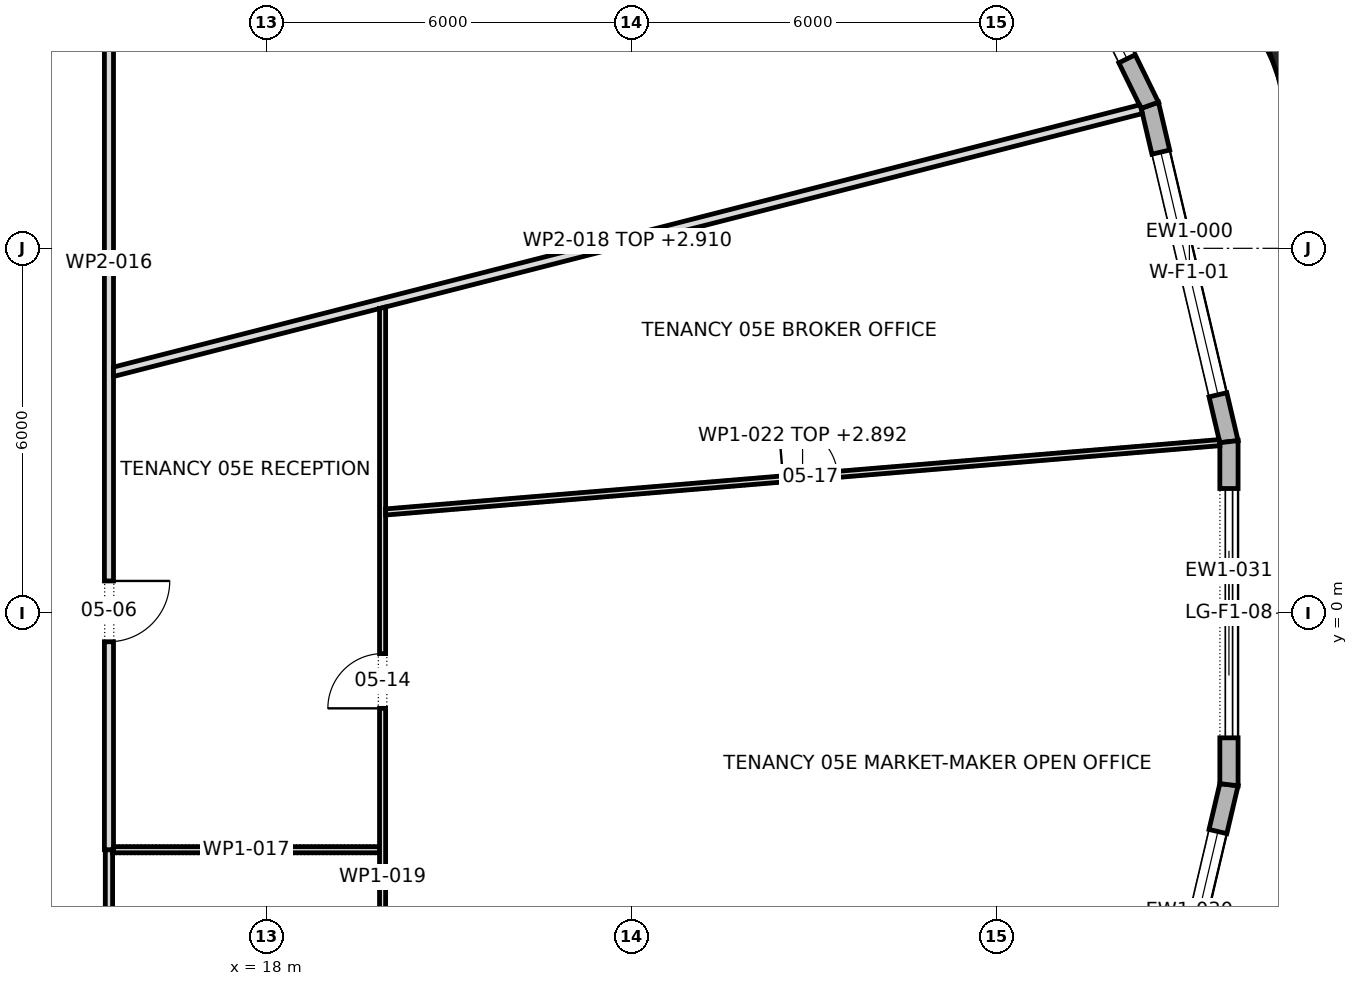
"""IFC4 building model, lengths in metres.
Left out: names, types, materials, properties, quantities, classifications, styles, units other than length and angle.
Written with IfcOpenShell. Run it as: python <this file> out.ifc"""

import sys

from ifc_helpers import new_model, si_unit, direction, frame, frame_2d, origin, origin_2d, place, context, subcontext, project, spatial, polyline, rectangle, outline, extrude, element, fill, save


model = new_model("IFC4")
c1 = context("Model", 3, precision=1e-05, world=origin(), true_north=direction((0.0, 1.0)))
c2 = subcontext(c1, "Body", "Model", "MODEL_VIEW")
j1 = project(units=[si_unit("LENGTHUNIT", "METRE"), si_unit("PLANEANGLEUNIT", "RADIAN")], contexts=[c1])
p1 = place(None, origin())
s1 = spatial("IfcSite", under=j1, at=p1, CompositionType="ELEMENT")
p2 = place(p1, origin())
s2 = spatial("IfcBuilding", under=s1, at=p2, CompositionType="ELEMENT")
p3 = place(p2, frame((0.0, 0.0, 73.9)))
s3 = spatial("IfcBuildingStorey", under=s2, at=p3, CompositionType="ELEMENT", Elevation=73.9)
p4 = place(p3, frame((35.054, 9.115, 0.0), z_axis=(0.0, 0.0, 1.0), x_axis=(-0.333624233576, 0.942706142321, 0.0)))
e1 = element("IfcColumn", 1, at=p4, inside=s3, PredefinedType="COLUMN", context=c2, shape_type="SweptSolid", body=[
    extrude(rectangle(XDim=1.6, YDim=1.0, at=origin_2d()), origin(), (0.0, 0.0, 1.0), 4.2),
])
p5 = place(p3, frame((33.819, 2.821, 0.0), z_axis=(0.0, 0.0, 1.0), x_axis=(-0.229058489262, 0.97341266095, 0.0)))
e2 = element("IfcWall", 2, at=p5, inside=s3, PredefinedType="STANDARD", context=c2, shape_type="SweptSolid", body=[
    extrude(outline(polyline([(-0.017, -0.15), (5.7, -0.15), (5.666, 0.15), (0.017, 0.15), (-0.017, -0.15)])), origin(), (0.0, 0.0, 1.0), 3.9),
])
p6 = place(p5, frame((0.792, 0.0, 0.6)))
e3 = element("IfcOpeningElement", 3, at=p6, cuts=e2, PredefinedType="OPENING", context=c2, shape_type="SweptSolid", body=[
    extrude(rectangle(XDim=4.1, YDim=2.85, at=frame_2d((2.05, 1.425))), frame((0.0, 0.162, 0.0), z_axis=(0.0, -1.0, 0.0), x_axis=(1.0, 0.0, 0.0)), (0.0, 0.0, 1.0), 0.324),
])
p7 = place(p3, frame((32.517, 8.353, 0.0), z_axis=(0.0, 0.0, 1.0), x_axis=(-0.440027465772, 0.897984314655, 0.0)))
e4 = element("IfcWall", 4, at=p7, inside=s3, PredefinedType="STANDARD", context=c2, shape_type="SweptSolid", body=[
    extrude(outline(polyline([(-0.017, -0.15), (5.817, -0.15), (5.785, 0.15), (0.017, 0.15), (-0.017, -0.15)])), origin(), (0.0, 0.0, 1.0), 3.9),
])
p8 = place(p7, frame((0.85, 0.0, 0.6)))
e5 = element("IfcOpeningElement", 5, at=p8, cuts=e4, PredefinedType="OPENING", context=c2, shape_type="SweptSolid", body=[
    extrude(rectangle(XDim=4.1, YDim=2.85, at=frame_2d((2.05, 1.425))), frame((0.0, 0.162, 0.0), z_axis=(0.0, -1.0, 0.0), x_axis=(1.0, 0.0, 0.0)), (0.0, 0.0, 1.0), 0.324),
])
p9 = place(p3, frame((32.517, -8.353, 0.0), z_axis=(0.0, 0.0, 1.0), x_axis=(0.229058489262, 0.97341266095, 0.0)))
e6 = element("IfcWall", 6, at=p9, inside=s3, PredefinedType="STANDARD", context=c2, shape_type="SweptSolid", body=[
    extrude(outline(polyline([(-0.017, -0.15), (5.7, -0.15), (5.666, 0.15), (0.017, 0.15), (-0.017, -0.15)])), origin(), (0.0, 0.0, 1.0), 3.9),
])
p10 = place(p9, frame((0.792, 0.0, 0.6)))
e7 = element("IfcOpeningElement", 7, at=p10, cuts=e6, PredefinedType="OPENING", context=c2, shape_type="SweptSolid", body=[
    extrude(rectangle(XDim=4.1, YDim=2.85, at=frame_2d((2.05, 1.425))), frame((0.0, 0.162, 0.0), z_axis=(0.0, -1.0, 0.0), x_axis=(1.0, 0.0, 0.0)), (0.0, 0.0, 1.0), 0.324),
])
p11 = place(p3, frame((33.819, -2.821, 0.0), z_axis=(0.0, 0.0, 1.0), x_axis=(0.0, 1.0, 0.0)))
e8 = element("IfcWall", 8, at=p11, inside=s3, PredefinedType="STANDARD", context=c2, shape_type="SweptSolid", body=[
    extrude(outline(polyline([(-0.017, -0.15), (5.658, -0.15), (5.624, 0.15), (0.017, 0.15), (-0.017, -0.15)])), origin(), (0.0, 0.0, 1.0), 3.9),
])
p12 = place(p11, frame((0.771, 0.0, 0.0)))
e9 = element("IfcOpeningElement", 9, at=p12, cuts=e8, PredefinedType="OPENING", context=c2, shape_type="SweptSolid", body=[
    extrude(rectangle(XDim=4.1, YDim=3.45, at=frame_2d((2.05, 1.725))), frame((0.0, 0.162, 0.0), z_axis=(0.0, -1.0, 0.0), x_axis=(1.0, 0.0, 0.0)), (0.0, 0.0, 1.0), 0.324),
])
p13 = place(p3, frame((15.4, -3.89, 0.0), z_axis=(0.0, 0.0, 1.0), x_axis=(0.0, -1.0, 0.0)))
e10 = element("IfcWall", 10, at=p13, inside=s3, PredefinedType="PARTITIONING", context=c2, shape_type="SweptSolid", body=[
    extrude(rectangle(XDim=6.79, YDim=0.12, at=frame_2d((3.395, 0.0))), origin(), (0.0, 0.0, 1.0), 3.9),
])
p14 = place(p13, frame((2.895, 0.0, 0.0)))
e11 = element("IfcOpeningElement", 11, at=p14, cuts=e10, PredefinedType="OPENING", context=c2, shape_type="SweptSolid", body=[
    extrude(rectangle(XDim=1.0, YDim=2.1, at=frame_2d((0.5, 1.05))), frame((0.0, 0.072, 0.0), z_axis=(0.0, -1.0, 0.0), x_axis=(1.0, 0.0, 0.0)), (0.0, 0.0, 1.0), 0.144),
])
p15 = place(p3, frame((15.4, -3.89, 0.0), z_axis=(0.0, 0.0, 1.0), x_axis=(0.0, 1.0, 0.0)))
e12 = element("IfcWall", 12, at=p15, inside=s3, PredefinedType="PARTITIONING", context=c2, shape_type="SweptSolid", body=[
    extrude(outline(polyline([(0.0, -0.075), (1.937, -0.075), (3.873, -0.075), (5.809, -0.075), (7.746, -0.075), (9.682, -0.075), (11.619, -0.075), (13.555, -0.075), (15.492, -0.075), (17.428, -0.075), (19.365, -0.075), (19.215, 0.075), (17.293, 0.075), (15.372, 0.075), (13.45, 0.075), (11.529, 0.075), (9.607, 0.075), (7.686, 0.075), (5.764, 0.075), (3.843, 0.075), (1.921, 0.075), (0.0, 0.075), (0.0, -0.075)])), origin(), (0.0, 0.0, 1.0), 3.9),
])
p16 = place(p15, frame((3.42, 0.0, 0.0)))
e13 = element("IfcOpeningElement", 13, at=p16, cuts=e12, PredefinedType="OPENING", context=c2, shape_type="SweptSolid", body=[
    extrude(rectangle(XDim=1.0, YDim=2.1, at=frame_2d((0.5, 1.05))), frame((0.0, 0.087, 0.0), z_axis=(0.0, -1.0, 0.0), x_axis=(1.0, 0.0, 0.0)), (0.0, 0.0, 1.0), 0.174),
])
p17 = place(p3, frame((15.46, -3.89, 0.0), z_axis=(0.0, 0.0, 1.0), x_axis=(1.0, 0.0, 0.0)))
e14 = element("IfcWall", 14, at=p17, inside=s3, PredefinedType="PARTITIONING", context=c2, shape_type="SweptSolid", body=[
    extrude(outline(polyline([(0.0, -0.05), (1.463, -0.05), (2.926, -0.05), (4.39, -0.05), (4.39, 0.05), (2.931, 0.05), (1.473, 0.05), (0.015, 0.05), (0.015, 0.0), (0.0, 0.0), (0.0, -0.05)])), origin(), (0.0, 0.0, 1.0), 3.9),
])
p18 = place(p3, frame((15.457, 3.965, 0.0), z_axis=(0.0, 0.0, 1.0), x_axis=(0.968864500014, 0.24759156006, 0.0)))
e15 = element("IfcWall", 15, at=p18, inside=s3, PredefinedType="PARTITIONING", context=c2, shape_type="SweptSolid", body=[
    extrude(outline(polyline([(0.0, -0.075), (1.505, -0.075), (3.01, -0.075), (4.515, -0.075), (4.515, -0.075), (4.516, -0.075), (6.365, -0.075), (8.215, -0.075), (10.064, -0.075), (11.914, -0.075), (13.764, -0.075), (15.614, -0.075), (17.463, -0.075), (17.463, 0.023), (17.452, 0.075), (15.517, 0.075), (13.582, 0.075), (11.647, 0.075), (9.713, 0.075), (7.778, 0.075), (5.843, 0.075), (3.908, 0.075), (1.973, 0.075), (0.038, 0.075), (0.0, -0.073), (0.0, -0.075)])), origin(), (0.0, 0.0, 1.0), 2.91),
])
p19 = place(p3, frame((19.9, -13.744, 0.0), z_axis=(0.0, 0.0, 1.0), x_axis=(0.0, 1.0, 0.0)))
e16 = element("IfcWall", 16, at=p19, inside=s3, PredefinedType="PARTITIONING", context=c2, shape_type="SweptSolid", body=[
    extrude(outline(polyline([(0.0, -0.05), (1.559, -0.05), (3.118, -0.05), (4.677, -0.05), (4.678, -0.048), (4.683, -0.05), (6.631, -0.05), (8.58, -0.05), (8.58, -0.048), (8.588, -0.05), (10.286, -0.05), (11.985, -0.05), (13.683, -0.05), (15.382, -0.05), (17.081, -0.05), (18.779, -0.05), (18.779, -0.048), (18.754, 0.05), (16.984, 0.05), (15.214, 0.05), (13.444, 0.05), (11.674, 0.05), (9.904, 0.05), (9.904, 0.05), (9.804, 0.05), (9.804, 0.05), (7.857, 0.05), (5.91, 0.05), (3.963, 0.05), (2.016, 0.05), (0.069, 0.05), (0.0, -0.05), (0.0, -0.05)])), origin(), (0.0, 0.0, 1.0), 3.9),
])
p20 = place(p19, frame((12.179, 0.0, 0.0)))
e17 = element("IfcOpeningElement", 17, at=p20, cuts=e16, PredefinedType="OPENING", context=c2, shape_type="SweptSolid", body=[
    extrude(rectangle(XDim=0.9, YDim=2.1, at=frame_2d((0.45, 1.05))), frame((0.0, 0.062, 0.0), z_axis=(0.0, -1.0, 0.0), x_axis=(1.0, 0.0, 0.0)), (0.0, 0.0, 1.0), 0.124),
])
p21 = place(p19, frame((1.899, 0.0, 0.0)))
e18 = element("IfcOpeningElement", 18, at=p21, cuts=e16, PredefinedType="OPENING", context=c2, shape_type="SweptSolid", body=[
    extrude(rectangle(XDim=0.9, YDim=2.1, at=frame_2d((0.45, 1.05))), frame((0.0, 0.062, 0.0), z_axis=(0.0, -1.0, 0.0), x_axis=(1.0, 0.0, 0.0)), (0.0, 0.0, 1.0), 0.124),
])
p22 = place(p3, frame((19.946, 1.664, 0.0), z_axis=(0.0, 0.0, 1.0), x_axis=(0.996559566172, 0.082879617945, 0.0)))
e19 = element("IfcWall", 19, at=p22, inside=s3, PredefinedType="PARTITIONING", context=c2, shape_type="SweptSolid", body=[
    extrude(outline(polyline([(13.765, -0.05), (13.765, 0.026), (13.762, 0.05), (11.797, 0.05), (9.832, 0.05), (7.867, 0.05), (5.902, 0.05), (3.938, 0.05), (1.973, 0.05), (0.008, 0.05), (0.0, -0.045), (0.0, -0.05), (1.967, -0.05), (3.933, -0.05), (5.899, -0.05), (7.866, -0.05), (9.833, -0.05), (11.799, -0.05), (13.765, -0.05)])), origin(), (0.0, 0.0, 1.0), 2.892),
])
p23 = place(p22, frame((6.563, 0.0, 0.0)))
e20 = element("IfcOpeningElement", 20, at=p23, cuts=e19, PredefinedType="OPENING", context=c2, shape_type="SweptSolid", body=[
    extrude(rectangle(XDim=0.9, YDim=2.1, at=frame_2d((0.45, 1.05))), frame((0.0, 0.062, 0.0), z_axis=(0.0, -1.0, 0.0), x_axis=(1.0, 0.0, 0.0)), (0.0, 0.0, 1.0), 0.124),
])
p24 = place(p6, origin())
e21 = element("IfcWindow", 21, at=p24, inside=s3, PartitioningType="TRIPLE_PANEL_VERTICAL", PredefinedType="WINDOW", context=c2, shape_type="SweptSolid", body=[
    extrude(rectangle(XDim=4.1, YDim=2.85, at=frame_2d((2.05, 1.425))), frame((0.0, 0.03, 0.0), z_axis=(0.0, -1.0, 0.0), x_axis=(1.0, 0.0, 0.0)), (0.0, 0.0, 1.0), 0.06),
])
fill(e3, e21)
p25 = place(p8, origin())
e22 = element("IfcWindow", 22, at=p25, inside=s3, PartitioningType="TRIPLE_PANEL_VERTICAL", PredefinedType="WINDOW", context=c2, shape_type="SweptSolid", body=[
    extrude(rectangle(XDim=4.1, YDim=2.85, at=frame_2d((2.05, 1.425))), frame((0.0, 0.03, 0.0), z_axis=(0.0, -1.0, 0.0), x_axis=(1.0, 0.0, 0.0)), (0.0, 0.0, 1.0), 0.06),
])
fill(e5, e22)
p26 = place(p10, origin())
e23 = element("IfcWindow", 23, at=p26, inside=s3, PartitioningType="TRIPLE_PANEL_VERTICAL", PredefinedType="WINDOW", context=c2, shape_type="SweptSolid", body=[
    extrude(rectangle(XDim=4.1, YDim=2.85, at=frame_2d((2.05, 1.425))), frame((0.0, 0.03, 0.0), z_axis=(0.0, -1.0, 0.0), x_axis=(1.0, 0.0, 0.0)), (0.0, 0.0, 1.0), 0.06),
])
fill(e7, e23)
p27 = place(p12, origin())
e24 = element("IfcDoor", 24, at=p27, inside=s3, OperationType="DOUBLE_DOOR_SLIDING", PredefinedType="DOOR", context=c2, shape_type="SweptSolid", body=[
    extrude(rectangle(XDim=4.1, YDim=3.45, at=frame_2d((2.05, 1.725))), frame((0.0, 0.025, 0.0), z_axis=(0.0, -1.0, 0.0), x_axis=(1.0, 0.0, 0.0)), (0.0, 0.0, 1.0), 0.05),
])
fill(e9, e24)
p28 = place(p16, frame((1.0, 0.0, 0.0), z_axis=(0.0, 0.0, 1.0), x_axis=(-1.0, 0.0, 0.0)))
e25 = element("IfcDoor", 25, at=p28, inside=s3, OperationType="SINGLE_SWING_RIGHT", PredefinedType="DOOR", context=c2, shape_type="SweptSolid", body=[
    extrude(rectangle(XDim=1.0, YDim=2.1, at=frame_2d((0.5, 1.05))), frame((0.0, 0.025, 0.0), z_axis=(0.0, -1.0, 0.0), x_axis=(1.0, 0.0, 0.0)), (0.0, 0.0, 1.0), 0.05),
])
fill(e13, e25)
p29 = place(p20, origin())
e26 = element("IfcDoor", 26, at=p29, inside=s3, OperationType="SINGLE_SWING_RIGHT", PredefinedType="DOOR", context=c2, shape_type="SweptSolid", body=[
    extrude(rectangle(XDim=0.9, YDim=2.1, at=frame_2d((0.45, 1.05))), frame((0.0, 0.025, 0.0), z_axis=(0.0, -1.0, 0.0), x_axis=(1.0, 0.0, 0.0)), (0.0, 0.0, 1.0), 0.05),
])
fill(e17, e26)
p30 = place(p23, origin())
e27 = element("IfcDoor", 27, at=p30, inside=s3, OperationType="SINGLE_SWING_RIGHT", PredefinedType="DOOR", context=c2, shape_type="SweptSolid", body=[
    extrude(rectangle(XDim=0.9, YDim=2.1, at=frame_2d((0.45, 1.05))), frame((0.0, 0.025, 0.0), z_axis=(0.0, -1.0, 0.0), x_axis=(1.0, 0.0, 0.0)), (0.0, 0.0, 1.0), 0.05),
])
fill(e20, e27)
save(model, sys.argv[1])
